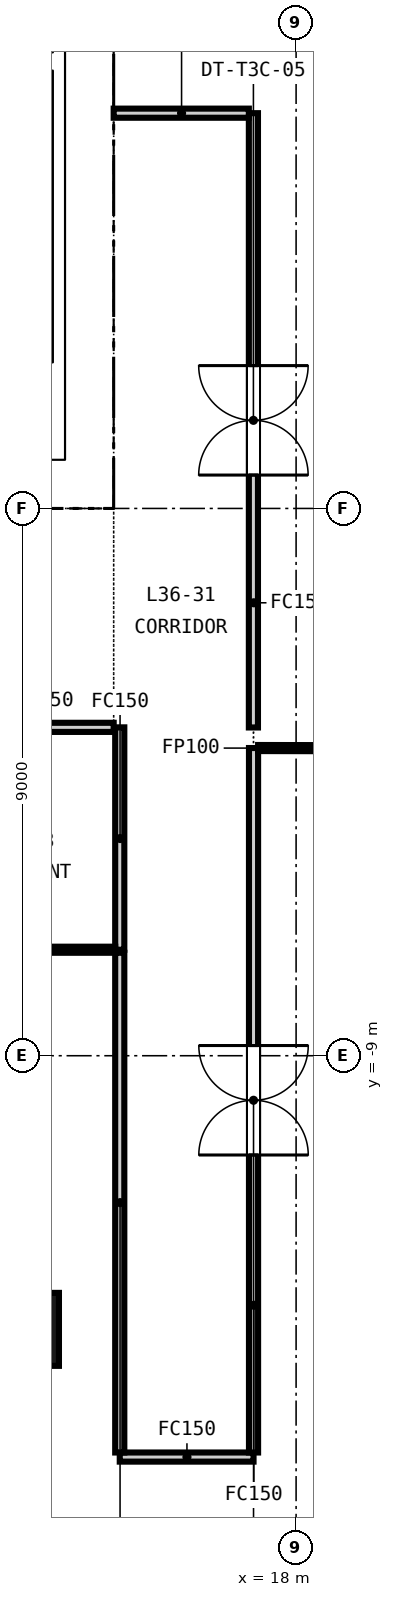
"""IFC4 building model, lengths in metres.
Left out: names, types, materials, properties, quantities, classifications, styles, units other than length and angle.
Written with IfcOpenShell. Run it as: python <this file> out.ifc"""

import sys

from ifc_helpers import new_model, si_unit, direction, frame, frame_2d, origin, origin_2d, place, context, subcontext, project, spatial, rectangle, extrude, element, fill, save


model = new_model("IFC4")
c1 = context("Model", 3, precision=1e-05, world=origin(), true_north=direction((0.0, 1.0)))
c2 = subcontext(c1, "Body", "Model", "MODEL_VIEW")
j1 = project(units=[si_unit("LENGTHUNIT", "METRE"), si_unit("PLANEANGLEUNIT", "RADIAN")], contexts=[c1])
p1 = place(None, origin())
s1 = spatial("IfcSite", under=j1, at=p1, CompositionType="ELEMENT")
p2 = place(p1, origin())
s2 = spatial("IfcBuilding", under=s1, at=p2, CompositionType="ELEMENT")
p3 = place(p2, frame((0.0, 0.0, 148.05)))
s3 = spatial("IfcBuildingStorey", under=s2, at=p3, CompositionType="ELEMENT", Elevation=148.05)
p4 = place(p3, frame((-15.0, 0.4, -0.15), z_axis=(0.0, 0.0, 1.0), x_axis=(1.0, 0.0, 0.0)))
e1 = element("IfcWall", 1, at=p4, inside=s3, PredefinedType="SOLIDWALL", context=c2, shape_type="SweptSolid", body=[
    extrude(rectangle(XDim=30.0, YDim=0.8, at=frame_2d((15.0, 0.0))), origin(), (0.0, 0.0, 1.0), 3.65),
])
p5 = place(p4, frame((5.8, 0.0, 0.15)))
e2 = element("IfcOpeningElement", 2, at=p5, cuts=e1, PredefinedType="OPENING", context=c2, shape_type="SweptSolid", body=[
    extrude(rectangle(XDim=2.4, YDim=2.4, at=frame_2d((1.2, 1.2))), frame((0.0, 0.41, 0.0), z_axis=(0.0, -1.0, 0.0), x_axis=(1.0, 0.0, 0.0)), (0.0, 0.0, 1.0), 0.82),
])
p6 = place(p4, frame((13.8, 0.0, 0.15)))
e3 = element("IfcOpeningElement", 3, at=p6, cuts=e1, PredefinedType="OPENING", context=c2, shape_type="SweptSolid", body=[
    extrude(rectangle(XDim=2.4, YDim=2.4, at=frame_2d((1.2, 1.2))), frame((0.0, 0.41, 0.0), z_axis=(0.0, -1.0, 0.0), x_axis=(1.0, 0.0, 0.0)), (0.0, 0.0, 1.0), 0.82),
])
p7 = place(p4, frame((21.8, 0.0, 0.15)))
e4 = element("IfcOpeningElement", 4, at=p7, cuts=e1, PredefinedType="OPENING", context=c2, shape_type="SweptSolid", body=[
    extrude(rectangle(XDim=2.4, YDim=2.4, at=frame_2d((1.2, 1.2))), frame((0.0, 0.41, 0.0), z_axis=(0.0, -1.0, 0.0), x_axis=(1.0, 0.0, 0.0)), (0.0, 0.0, 1.0), 0.82),
])
p8 = place(p4, frame((1.5, 0.0, 0.15)))
e5 = element("IfcOpeningElement", 5, at=p8, cuts=e1, PredefinedType="OPENING", context=c2, shape_type="SweptSolid", body=[
    extrude(rectangle(XDim=1.2, YDim=2.1, at=frame_2d((0.6, 1.05))), frame((0.0, 0.41, 0.0), z_axis=(0.0, -1.0, 0.0), x_axis=(1.0, 0.0, 0.0)), (0.0, 0.0, 1.0), 0.82),
])
p9 = place(p4, frame((27.3, 0.0, 0.15)))
e6 = element("IfcOpeningElement", 6, at=p9, cuts=e1, PredefinedType="OPENING", context=c2, shape_type="SweptSolid", body=[
    extrude(rectangle(XDim=1.2, YDim=2.1, at=frame_2d((0.6, 1.05))), frame((0.0, 0.41, 0.0), z_axis=(0.0, -1.0, 0.0), x_axis=(1.0, 0.0, 0.0)), (0.0, 0.0, 1.0), 0.82),
])
p10 = place(p3, frame((14.6, 0.8, -0.15), z_axis=(0.0, 0.0, 1.0), x_axis=(0.0, 1.0, 0.0)))
e7 = element("IfcWall", 7, at=p10, inside=s3, PredefinedType="SOLIDWALL", context=c2, shape_type="SweptSolid", body=[
    extrude(rectangle(XDim=13.4, YDim=0.8, at=frame_2d((6.7, 0.0))), origin(), (0.0, 0.0, 1.0), 3.65),
])
p11 = place(p3, frame((13.5, -13.5, -0.15), z_axis=(0.0, 0.0, 1.0), x_axis=(1.0, 0.0, 0.0)))
e8 = element("IfcColumn", 8, at=p11, inside=s3, PredefinedType="COLUMN", context=c2, shape_type="SweptSolid", body=[
    extrude(rectangle(XDim=1.2, YDim=1.2, at=origin_2d()), origin(), (0.0, 0.0, 1.0), 3.65),
])
p12 = place(p3, frame((11.05, 7.35, 0.0), z_axis=(0.0, 0.0, 1.0), x_axis=(1.0, 0.0, 0.0)))
e9 = element("IfcWall", 9, at=p12, inside=s3, PredefinedType="SOLIDWALL", context=c2, shape_type="SweptSolid", body=[
    extrude(rectangle(XDim=2.95, YDim=0.3, at=frame_2d((1.475, 0.0))), origin(), (0.0, 0.0, 1.0), 3.5),
])
p13 = place(p3, frame((14.1, 0.8, 0.0), z_axis=(0.0, 0.0, 1.0), x_axis=(0.0, 1.0, 0.0)))
e10 = element("IfcWall", 10, at=p13, inside=s3, PredefinedType="SOLIDWALL", context=c2, shape_type="SweptSolid", body=[
    extrude(rectangle(XDim=13.4, YDim=0.2, at=frame_2d((6.7, 0.0))), origin(), (0.0, 0.0, 1.0), 3.5),
])
p14 = place(p3, frame((15.0, -3.6, 0.0), z_axis=(0.0, 0.0, 1.0), x_axis=(-1.0, 0.0, 0.0)))
e11 = element("IfcWall", 11, at=p14, inside=s3, PredefinedType="PARTITIONING", context=c2, shape_type="SweptSolid", body=[
    extrude(rectangle(XDim=5.65, YDim=0.15, at=frame_2d((2.825, 0.0))), origin(), (0.0, 0.0, 1.0), 2.741),
])
p15 = place(p14, frame((2.325, 0.0, 0.0)))
e12 = element("IfcOpeningElement", 12, at=p15, cuts=e11, PredefinedType="OPENING", context=c2, shape_type="SweptSolid", body=[
    extrude(rectangle(XDim=1.0, YDim=2.1, at=frame_2d((0.5, 1.05))), frame((0.0, 0.085, 0.0), z_axis=(0.0, -1.0, 0.0), x_axis=(1.0, 0.0, 0.0)), (0.0, 0.0, 1.0), 0.17),
])
p16 = place(p3, frame((17.298, 6.5, 0.0), z_axis=(0.0, 0.0, 1.0), x_axis=(0.0, -1.0, 0.0)))
e13 = element("IfcWall", 13, at=p16, inside=s3, PredefinedType="PARTITIONING", context=c2, shape_type="SweptSolid", body=[
    extrude(rectangle(XDim=10.102, YDim=0.15, at=frame_2d((5.051, 0.0))), origin(), (0.0, 0.0, 1.0), 2.741),
])
p17 = place(p16, frame((4.151, 0.0, 0.0)))
e14 = element("IfcOpeningElement", 14, at=p17, cuts=e13, PredefinedType="OPENING", context=c2, shape_type="SweptSolid", body=[
    extrude(rectangle(XDim=1.8, YDim=2.1, at=frame_2d((0.9, 1.05))), frame((0.0, 0.085, 0.0), z_axis=(0.0, -1.0, 0.0), x_axis=(1.0, 0.0, 0.0)), (0.0, 0.0, 1.0), 0.17),
])
p18 = place(p3, frame((17.3, -15.6, 0.0), z_axis=(0.0, 0.0, 1.0), x_axis=(-1.0, 0.0, 0.0)))
e15 = element("IfcWall", 15, at=p18, inside=s3, PredefinedType="PARTITIONING", context=c2, shape_type="SweptSolid", body=[
    extrude(rectangle(XDim=2.2, YDim=0.15, at=frame_2d((1.1, 0.0))), origin(), (0.0, 0.0, 1.0), 2.741),
])
p19 = place(p3, frame((17.3, -3.94, 0.0), z_axis=(0.0, 0.0, 1.0), x_axis=(0.0, -1.0, 0.0)))
e16 = element("IfcWall", 16, at=p19, inside=s3, PredefinedType="PARTITIONING", context=c2, shape_type="SweptSolid", body=[
    extrude(rectangle(XDim=11.585, YDim=0.15, at=frame_2d((5.792, 0.0))), origin(), (0.0, 0.0, 1.0), 2.741),
])
p20 = place(p19, frame((4.893, 0.0, 0.0)))
e17 = element("IfcOpeningElement", 17, at=p20, cuts=e16, PredefinedType="OPENING", context=c2, shape_type="SweptSolid", body=[
    extrude(rectangle(XDim=1.8, YDim=2.1, at=frame_2d((0.9, 1.05))), frame((0.0, 0.085, 0.0), z_axis=(0.0, -1.0, 0.0), x_axis=(1.0, 0.0, 0.0)), (0.0, 0.0, 1.0), 0.17),
])
p21 = place(p3, frame((15.0, 6.5, 0.0), z_axis=(0.0, 0.0, 1.0), x_axis=(1.0, 0.0, 0.0)))
e18 = element("IfcWall", 18, at=p21, inside=s3, PredefinedType="PARTITIONING", context=c2, shape_type="SweptSolid", body=[
    extrude(rectangle(XDim=2.223, YDim=0.15, at=frame_2d((1.111, 0.0))), origin(), (0.0, 0.0, 1.0), 2.741),
])
p22 = place(p3, frame((18.403, -3.942, 0.0), z_axis=(0.0, 0.0, 1.0), x_axis=(-0.999998618361, 0.001662310693, 0.0)))
e19 = element("IfcWall", 19, at=p22, inside=s3, PredefinedType="PARTITIONING", context=c2, shape_type="SweptSolid", body=[
    extrude(rectangle(XDim=1.028, YDim=0.1, at=frame_2d((0.514, 0.0))), origin(), (0.0, 0.0, 1.0), 2.741),
])
p23 = place(p3, frame((15.1, -7.257, 0.0), z_axis=(0.0, 0.0, 1.0), x_axis=(0.0, 1.0, 0.0)))
e20 = element("IfcWall", 20, at=p23, inside=s3, PredefinedType="PARTITIONING", context=c2, shape_type="SweptSolid", body=[
    extrude(rectangle(XDim=3.657, YDim=0.15, at=frame_2d((1.829, 0.0))), origin(), (0.0, 0.0, 1.0), 2.741),
])
p24 = place(p3, frame((9.35, -7.257, 0.0), z_axis=(0.0, 0.0, 1.0), x_axis=(1.0, 0.0, 0.0)))
e21 = element("IfcWall", 21, at=p24, inside=s3, PredefinedType="PARTITIONING", context=c2, shape_type="SweptSolid", body=[
    extrude(rectangle(XDim=5.675, YDim=0.1, at=frame_2d((2.837, 0.0))), origin(), (0.0, 0.0, 1.0), 2.741),
])
p25 = place(p3, frame((15.1, -15.525, 0.0), z_axis=(0.0, 0.0, 1.0), x_axis=(0.0, 1.0, 0.0)))
e22 = element("IfcWall", 22, at=p25, inside=s3, PredefinedType="PARTITIONING", context=c2, shape_type="SweptSolid", body=[
    extrude(rectangle(XDim=8.218, YDim=0.15, at=frame_2d((4.109, 0.0))), origin(), (0.0, 0.0, 1.0), 2.741),
])
p26 = place(p17, origin())
e23 = element("IfcDoor", 23, at=p26, inside=s3, OperationType="DOUBLE_DOOR_DOUBLE_SWING", PredefinedType="DOOR", context=c2, shape_type="SweptSolid", body=[
    extrude(rectangle(XDim=1.8, YDim=2.1, at=frame_2d((0.9, 1.05))), frame((0.0, 0.025, 0.0), z_axis=(0.0, -1.0, 0.0), x_axis=(1.0, 0.0, 0.0)), (0.0, 0.0, 1.0), 0.05),
])
fill(e14, e23)
p27 = place(p20, origin())
e24 = element("IfcDoor", 24, at=p27, inside=s3, OperationType="DOUBLE_DOOR_DOUBLE_SWING", PredefinedType="DOOR", context=c2, shape_type="SweptSolid", body=[
    extrude(rectangle(XDim=1.8, YDim=2.1, at=frame_2d((0.9, 1.05))), frame((0.0, 0.025, 0.0), z_axis=(0.0, -1.0, 0.0), x_axis=(1.0, 0.0, 0.0)), (0.0, 0.0, 1.0), 0.05),
])
fill(e17, e24)
save(model, sys.argv[1])
